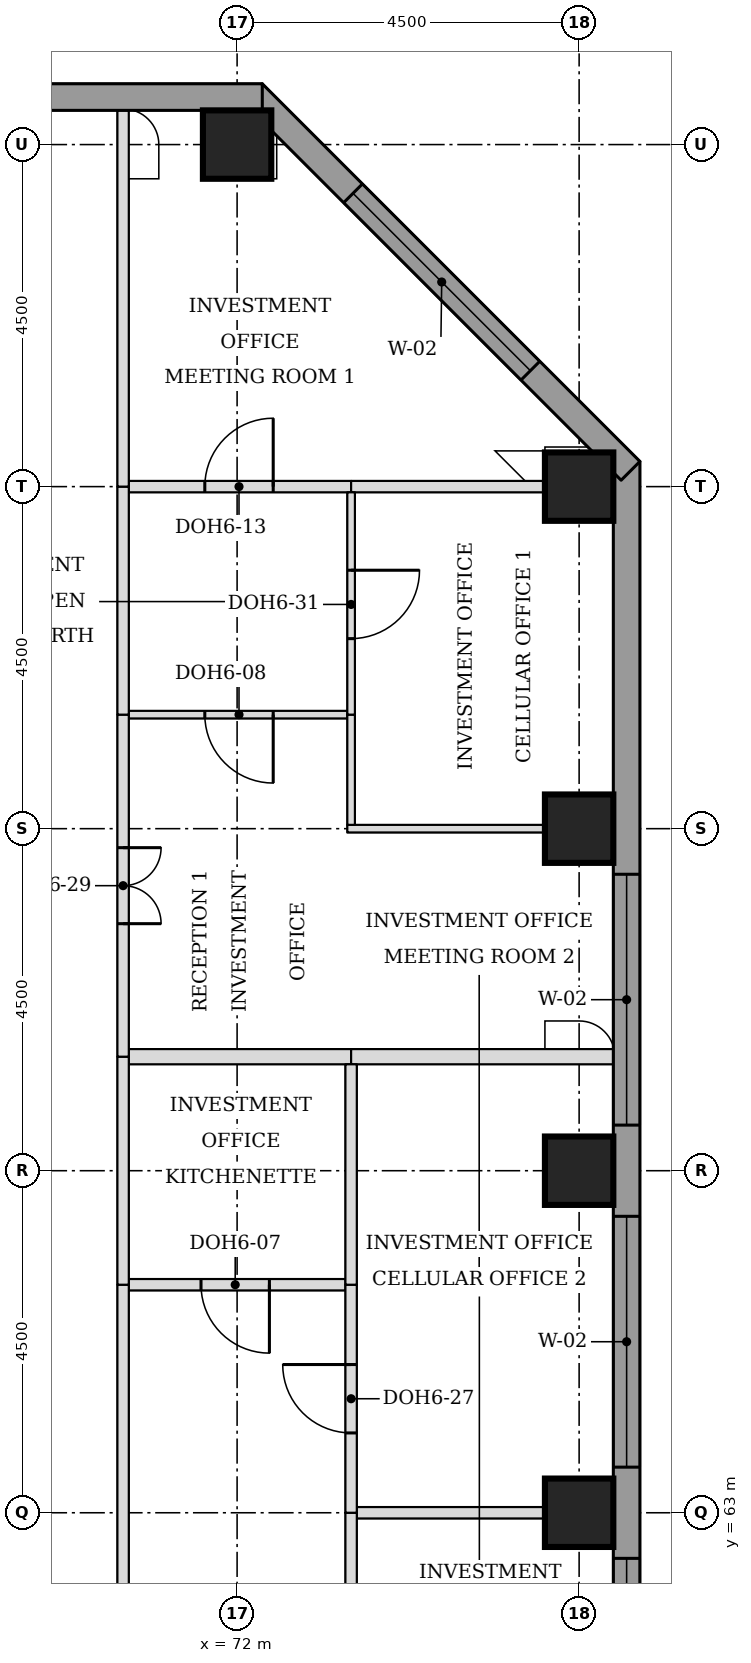
"""IFC4 building model, lengths in metres.
Left out: names, types, materials, properties, quantities, classifications, styles, units other than length and angle.
Written with IfcOpenShell. Run it as: python <this file> out.ifc"""

import sys

from ifc_helpers import new_model, si_unit, direction, frame, frame_2d, origin, origin_2d, place, context, subcontext, project, spatial, rectangle, extrude, element, fill, save


model = new_model("IFC4")
c1 = context("Model", 3, precision=1e-05, world=origin(), true_north=direction((0.0, 1.0)))
c2 = subcontext(c1, "Body", "Model", "MODEL_VIEW")
j1 = project(units=[si_unit("LENGTHUNIT", "METRE"), si_unit("PLANEANGLEUNIT", "RADIAN")], contexts=[c1])
p1 = place(None, origin())
s1 = spatial("IfcSite", under=j1, at=p1, CompositionType="ELEMENT")
p2 = place(p1, origin())
s2 = spatial("IfcBuilding", under=s1, at=p2, CompositionType="ELEMENT")
p3 = place(p2, frame((0.0, 0.0, 184.7)))
s3 = spatial("IfcBuildingStorey", under=s2, at=p3, CompositionType="ELEMENT", Elevation=184.7)
for number, where, z_axis, x_axis in (
    (1, (76.5, 63.0, 0.0), (0.0, 0.0, 1.0), (1.0, 0.0, 0.0)),
    (2, (76.5, 67.5, 0.0), (0.0, 0.0, 1.0), (1.0, 0.0, 0.0)),
    (3, (76.5, 72.0, 0.0), (0.0, 0.0, 1.0), (1.0, 0.0, 0.0)),
    (4, (76.5, 76.5, 0.0), (0.0, 0.0, 1.0), (1.0, 0.0, 0.0)),
    (5, (72.0, 81.0, 0.0), (0.0, 0.0, 1.0), (1.0, 0.0, 0.0)),
):
    element("IfcColumn", number, at=place(p3, frame(where, z_axis=z_axis, x_axis=x_axis)), inside=s3, PredefinedType="COLUMN", context=c2, shape_type="SweptSolid", body=[
        extrude(rectangle(XDim=0.9, YDim=0.9, at=origin_2d()), origin(), (0.0, 0.0, 1.0), 3.7),
    ])
p4 = place(p3, frame((77.125, 44.669, 0.0), z_axis=(0.0, 0.0, 1.0), x_axis=(0.0, 1.0, 0.0)))
e6 = element("IfcWall", 6, at=p4, inside=s3, PredefinedType="STANDARD", context=c2, shape_type="SweptSolid", body=[
    extrude(rectangle(XDim=32.163, YDim=0.35, at=frame_2d((16.081, 0.0))), origin(), (0.0, 0.0, 1.0), 3.525),
])
p5 = place(p4, frame((5.431, 0.0, 0.9)))
e7 = element("IfcOpeningElement", 7, at=p5, cuts=e6, PredefinedType="OPENING", context=c2, shape_type="SweptSolid", body=[
    extrude(rectangle(XDim=3.3, YDim=1.9, at=frame_2d((1.65, 0.95))), frame((0.0, 0.185, 0.0), z_axis=(0.0, -1.0, 0.0), x_axis=(1.0, 0.0, 0.0)), (0.0, 0.0, 1.0), 0.37),
])
p6 = place(p4, frame((9.931, 0.0, 0.9)))
e8 = element("IfcOpeningElement", 8, at=p6, cuts=e6, PredefinedType="OPENING", context=c2, shape_type="SweptSolid", body=[
    extrude(rectangle(XDim=3.3, YDim=1.9, at=frame_2d((1.65, 0.95))), frame((0.0, 0.185, 0.0), z_axis=(0.0, -1.0, 0.0), x_axis=(1.0, 0.0, 0.0)), (0.0, 0.0, 1.0), 0.37),
])
p7 = place(p4, frame((14.431, 0.0, 0.9)))
e9 = element("IfcOpeningElement", 9, at=p7, cuts=e6, PredefinedType="OPENING", context=c2, shape_type="SweptSolid", body=[
    extrude(rectangle(XDim=3.3, YDim=1.9, at=frame_2d((1.65, 0.95))), frame((0.0, 0.185, 0.0), z_axis=(0.0, -1.0, 0.0), x_axis=(1.0, 0.0, 0.0)), (0.0, 0.0, 1.0), 0.37),
])
p8 = place(p4, frame((18.931, 0.0, 0.9)))
e10 = element("IfcOpeningElement", 10, at=p8, cuts=e6, PredefinedType="OPENING", context=c2, shape_type="SweptSolid", body=[
    extrude(rectangle(XDim=3.3, YDim=1.9, at=frame_2d((1.65, 0.95))), frame((0.0, 0.185, 0.0), z_axis=(0.0, -1.0, 0.0), x_axis=(1.0, 0.0, 0.0)), (0.0, 0.0, 1.0), 0.37),
])
p9 = place(p4, frame((23.431, 0.0, 0.9)))
e11 = element("IfcOpeningElement", 11, at=p9, cuts=e6, PredefinedType="OPENING", context=c2, shape_type="SweptSolid", body=[
    extrude(rectangle(XDim=3.3, YDim=1.9, at=frame_2d((1.65, 0.95))), frame((0.0, 0.185, 0.0), z_axis=(0.0, -1.0, 0.0), x_axis=(1.0, 0.0, 0.0)), (0.0, 0.0, 1.0), 0.37),
])
p10 = place(p3, frame((77.176, 76.708, 0.0), z_axis=(0.0, 0.0, 1.0), x_axis=(-0.707106781187, 0.707106781187, 0.0)))
e12 = element("IfcWall", 12, at=p10, inside=s3, PredefinedType="STANDARD", context=c2, shape_type="SweptSolid", body=[
    extrude(rectangle(XDim=7.027, YDim=0.35, at=frame_2d((3.513, 0.0))), origin(), (0.0, 0.0, 1.0), 3.525),
])
p11 = place(p10, frame((1.863, 0.0, 0.9)))
e13 = element("IfcOpeningElement", 13, at=p11, cuts=e12, PredefinedType="OPENING", context=c2, shape_type="SweptSolid", body=[
    extrude(rectangle(XDim=3.3, YDim=1.9, at=frame_2d((1.65, 0.95))), frame((0.0, 0.185, 0.0), z_axis=(0.0, -1.0, 0.0), x_axis=(1.0, 0.0, 0.0)), (0.0, 0.0, 1.0), 0.37),
])
p12 = place(p3, frame((72.331, 81.625, 0.0), z_axis=(0.0, 0.0, 1.0), x_axis=(-1.0, 0.0, 0.0)))
e14 = element("IfcWall", 14, at=p12, inside=s3, PredefinedType="STANDARD", context=c2, shape_type="SweptSolid", body=[
    extrude(rectangle(XDim=32.163, YDim=0.35, at=frame_2d((16.081, 0.0))), origin(), (0.0, 0.0, 1.0), 3.525),
])
p13 = place(p12, frame((5.431, 0.0, 0.9)))
e15 = element("IfcOpeningElement", 15, at=p13, cuts=e14, PredefinedType="OPENING", context=c2, shape_type="SweptSolid", body=[
    extrude(rectangle(XDim=3.3, YDim=1.9, at=frame_2d((1.65, 0.95))), frame((0.0, 0.185, 0.0), z_axis=(0.0, -1.0, 0.0), x_axis=(1.0, 0.0, 0.0)), (0.0, 0.0, 1.0), 0.37),
])
p14 = place(p12, frame((9.931, 0.0, 0.9)))
e16 = element("IfcOpeningElement", 16, at=p14, cuts=e14, PredefinedType="OPENING", context=c2, shape_type="SweptSolid", body=[
    extrude(rectangle(XDim=3.3, YDim=1.9, at=frame_2d((1.65, 0.95))), frame((0.0, 0.185, 0.0), z_axis=(0.0, -1.0, 0.0), x_axis=(1.0, 0.0, 0.0)), (0.0, 0.0, 1.0), 0.37),
])
p15 = place(p12, frame((14.431, 0.0, 0.9)))
e17 = element("IfcOpeningElement", 17, at=p15, cuts=e14, PredefinedType="OPENING", context=c2, shape_type="SweptSolid", body=[
    extrude(rectangle(XDim=3.3, YDim=1.9, at=frame_2d((1.65, 0.95))), frame((0.0, 0.185, 0.0), z_axis=(0.0, -1.0, 0.0), x_axis=(1.0, 0.0, 0.0)), (0.0, 0.0, 1.0), 0.37),
])
p16 = place(p12, frame((18.931, 0.0, 0.9)))
e18 = element("IfcOpeningElement", 18, at=p16, cuts=e14, PredefinedType="OPENING", context=c2, shape_type="SweptSolid", body=[
    extrude(rectangle(XDim=3.3, YDim=1.9, at=frame_2d((1.65, 0.95))), frame((0.0, 0.185, 0.0), z_axis=(0.0, -1.0, 0.0), x_axis=(1.0, 0.0, 0.0)), (0.0, 0.0, 1.0), 0.37),
])
p17 = place(p12, frame((23.431, 0.0, 0.9)))
e19 = element("IfcOpeningElement", 19, at=p17, cuts=e14, PredefinedType="OPENING", context=c2, shape_type="SweptSolid", body=[
    extrude(rectangle(XDim=3.3, YDim=1.9, at=frame_2d((1.65, 0.95))), frame((0.0, 0.185, 0.0), z_axis=(0.0, -1.0, 0.0), x_axis=(1.0, 0.0, 0.0)), (0.0, 0.0, 1.0), 0.37),
])
p18 = place(p3, frame((73.575, 63.0, 0.0), z_axis=(0.0, 0.0, 1.0), x_axis=(1.0, 0.0, 0.0)))
e20 = element("IfcWall", 20, at=p18, inside=s3, PredefinedType="PARTITIONING", context=c2, shape_type="SweptSolid", body=[
    extrude(rectangle(XDim=3.375, YDim=0.15, at=frame_2d((1.688, 0.0))), origin(), (0.0, 0.0, 1.0), 3.55),
])
p19 = place(p3, frame((70.575, 66.0, 0.0), z_axis=(0.0, 0.0, 1.0), x_axis=(1.0, 0.0, 0.0)))
e21 = element("IfcWall", 21, at=p19, inside=s3, PredefinedType="PARTITIONING", context=c2, shape_type="SweptSolid", body=[
    extrude(rectangle(XDim=2.85, YDim=0.15, at=frame_2d((1.425, 0.0))), origin(), (0.0, 0.0, 1.0), 3.55),
])
p20 = place(p19, frame((0.95, 0.0, 0.0)))
e22 = element("IfcOpeningElement", 22, at=p20, cuts=e21, PredefinedType="OPENING", context=c2, shape_type="SweptSolid", body=[
    extrude(rectangle(XDim=0.9, YDim=2.1, at=frame_2d((0.45, 1.05))), frame((0.0, 0.085, 0.0), z_axis=(0.0, -1.0, 0.0), x_axis=(1.0, 0.0, 0.0)), (0.0, 0.0, 1.0), 0.17),
])
p21 = place(p3, frame((70.575, 69.0, 0.0), z_axis=(0.0, 0.0, 1.0), x_axis=(1.0, 0.0, 0.0)))
e23 = element("IfcWall", 23, at=p21, inside=s3, PredefinedType="PARTITIONING", context=c2, shape_type="SweptSolid", body=[
    extrude(rectangle(XDim=2.925, YDim=0.2, at=frame_2d((1.462, 0.0))), origin(), (0.0, 0.0, 1.0), 3.55),
])
p22 = place(p3, frame((73.5, 69.0, 0.0), z_axis=(0.0, 0.0, 1.0), x_axis=(1.0, 0.0, 0.0)))
e24 = element("IfcWall", 24, at=p22, inside=s3, PredefinedType="PARTITIONING", context=c2, shape_type="SweptSolid", body=[
    extrude(rectangle(XDim=3.45, YDim=0.2, at=frame_2d((1.725, 0.0))), origin(), (0.0, 0.0, 1.0), 3.55),
])
p23 = place(p3, frame((73.45, 72.0, 0.0), z_axis=(0.0, 0.0, 1.0), x_axis=(1.0, 0.0, 0.0)))
e25 = element("IfcWall", 25, at=p23, inside=s3, PredefinedType="PARTITIONING", context=c2, shape_type="SweptSolid", body=[
    extrude(rectangle(XDim=3.5, YDim=0.1, at=frame_2d((1.75, 0.0))), origin(), (0.0, 0.0, 1.0), 3.55),
])
p24 = place(p3, frame((70.575, 73.5, 0.0), z_axis=(0.0, 0.0, 1.0), x_axis=(1.0, 0.0, 0.0)))
e26 = element("IfcWall", 26, at=p24, inside=s3, PredefinedType="PARTITIONING", context=c2, shape_type="SweptSolid", body=[
    extrude(rectangle(XDim=2.875, YDim=0.1, at=frame_2d((1.438, 0.0))), origin(), (0.0, 0.0, 1.0), 3.096),
])
p25 = place(p24, frame((1.0, 0.0, 0.0)))
e27 = element("IfcOpeningElement", 27, at=p25, cuts=e26, PredefinedType="OPENING", context=c2, shape_type="SweptSolid", body=[
    extrude(rectangle(XDim=0.9, YDim=2.1, at=frame_2d((0.45, 1.05))), frame((0.0, 0.06, 0.0), z_axis=(0.0, -1.0, 0.0), x_axis=(1.0, 0.0, 0.0)), (0.0, 0.0, 1.0), 0.12),
])
p26 = place(p3, frame((70.575, 76.5, 0.0), z_axis=(0.0, 0.0, 1.0), x_axis=(1.0, 0.0, 0.0)))
e28 = element("IfcWall", 28, at=p26, inside=s3, PredefinedType="PARTITIONING", context=c2, shape_type="SweptSolid", body=[
    extrude(rectangle(XDim=2.925, YDim=0.15, at=frame_2d((1.462, 0.0))), origin(), (0.0, 0.0, 1.0), 3.096),
])
p27 = place(p26, frame((1.0, 0.0, 0.0)))
e29 = element("IfcOpeningElement", 29, at=p27, cuts=e28, PredefinedType="OPENING", context=c2, shape_type="SweptSolid", body=[
    extrude(rectangle(XDim=0.9, YDim=2.1, at=frame_2d((0.45, 1.05))), frame((0.0, 0.085, 0.0), z_axis=(0.0, -1.0, 0.0), x_axis=(1.0, 0.0, 0.0)), (0.0, 0.0, 1.0), 0.17),
])
p28 = place(p3, frame((73.5, 76.5, 0.0), z_axis=(0.0, 0.0, 1.0), x_axis=(1.0, 0.0, 0.0)))
e30 = element("IfcWall", 30, at=p28, inside=s3, PredefinedType="PARTITIONING", context=c2, shape_type="SweptSolid", body=[
    extrude(rectangle(XDim=2.55, YDim=0.15, at=frame_2d((1.275, 0.0))), origin(), (0.0, 0.0, 1.0), 3.096),
])
p29 = place(p3, frame((70.5, 45.0, 0.0), z_axis=(0.0, 0.0, 1.0), x_axis=(0.0, 1.0, 0.0)))
e31 = element("IfcWall", 31, at=p29, inside=s3, PredefinedType="PARTITIONING", context=c2, shape_type="SweptSolid", body=[
    extrude(rectangle(XDim=21.0, YDim=0.15, at=frame_2d((10.5, 0.0))), origin(), (0.0, 0.0, 1.0), 3.55),
])
p30 = place(p3, frame((73.5, 58.5, 0.0), z_axis=(0.0, 0.0, 1.0), x_axis=(0.0, 1.0, 0.0)))
e32 = element("IfcWall", 32, at=p30, inside=s3, PredefinedType="PARTITIONING", context=c2, shape_type="SweptSolid", body=[
    extrude(rectangle(XDim=4.5, YDim=0.15, at=frame_2d((2.25, 0.0))), origin(), (0.0, 0.0, 1.0), 3.55),
])
p31 = place(p30, frame((1.8, 0.0, 0.0)))
e33 = element("IfcOpeningElement", 33, at=p31, cuts=e32, PredefinedType="OPENING", context=c2, shape_type="SweptSolid", body=[
    extrude(rectangle(XDim=0.9, YDim=2.1, at=frame_2d((0.45, 1.05))), frame((0.0, 0.085, 0.0), z_axis=(0.0, -1.0, 0.0), x_axis=(1.0, 0.0, 0.0)), (0.0, 0.0, 1.0), 0.17),
])
p32 = place(p3, frame((73.5, 63.0, 0.0), z_axis=(0.0, 0.0, 1.0), x_axis=(0.0, 1.0, 0.0)))
e34 = element("IfcWall", 34, at=p32, inside=s3, PredefinedType="PARTITIONING", context=c2, shape_type="SweptSolid", body=[
    extrude(rectangle(XDim=3.0, YDim=0.15, at=frame_2d((1.5, 0.0))), origin(), (0.0, 0.0, 1.0), 3.55),
])
p33 = place(p32, frame((1.05, 0.0, 0.0)))
e35 = element("IfcOpeningElement", 35, at=p33, cuts=e34, PredefinedType="OPENING", context=c2, shape_type="SweptSolid", body=[
    extrude(rectangle(XDim=0.9, YDim=2.1, at=frame_2d((0.45, 1.05))), frame((0.0, 0.085, 0.0), z_axis=(0.0, -1.0, 0.0), x_axis=(1.0, 0.0, 0.0)), (0.0, 0.0, 1.0), 0.17),
])
p34 = place(p3, frame((70.5, 66.0, 0.0), z_axis=(0.0, 0.0, 1.0), x_axis=(0.0, 1.0, 0.0)))
e36 = element("IfcWall", 36, at=p34, inside=s3, PredefinedType="PARTITIONING", context=c2, shape_type="SweptSolid", body=[
    extrude(rectangle(XDim=3.0, YDim=0.15, at=frame_2d((1.5, 0.0))), origin(), (0.0, 0.0, 1.0), 3.55),
])
p35 = place(p3, frame((73.5, 66.0, 0.0), z_axis=(0.0, 0.0, 1.0), x_axis=(0.0, 1.0, 0.0)))
e37 = element("IfcWall", 37, at=p35, inside=s3, PredefinedType="PARTITIONING", context=c2, shape_type="SweptSolid", body=[
    extrude(rectangle(XDim=2.9, YDim=0.15, at=frame_2d((1.45, 0.0))), origin(), (0.0, 0.0, 1.0), 3.55),
])
p36 = place(p3, frame((70.5, 69.0, 0.0), z_axis=(0.0, 0.0, 1.0), x_axis=(0.0, 1.0, 0.0)))
e38 = element("IfcWall", 38, at=p36, inside=s3, PredefinedType="PARTITIONING", context=c2, shape_type="SweptSolid", body=[
    extrude(rectangle(XDim=4.5, YDim=0.15, at=frame_2d((2.25, 0.0))), origin(), (0.0, 0.0, 1.0), 3.55),
])
p37 = place(p36, frame((1.75, 0.0, 0.0)))
e39 = element("IfcOpeningElement", 39, at=p37, cuts=e38, PredefinedType="OPENING", context=c2, shape_type="SweptSolid", body=[
    extrude(rectangle(XDim=1.0, YDim=2.1, at=frame_2d((0.5, 1.05))), frame((0.0, 0.085, 0.0), z_axis=(0.0, -1.0, 0.0), x_axis=(1.0, 0.0, 0.0)), (0.0, 0.0, 1.0), 0.17),
])
p38 = place(p3, frame((73.5, 72.05, 0.0), z_axis=(0.0, 0.0, 1.0), x_axis=(0.0, 1.0, 0.0)))
e40 = element("IfcWall", 40, at=p38, inside=s3, PredefinedType="PARTITIONING", context=c2, shape_type="SweptSolid", body=[
    extrude(rectangle(XDim=1.45, YDim=0.1, at=frame_2d((0.725, 0.0))), origin(), (0.0, 0.0, 1.0), 3.55),
])
p39 = place(p3, frame((70.5, 73.5, 0.0), z_axis=(0.0, 0.0, 1.0), x_axis=(0.0, 1.0, 0.0)))
e41 = element("IfcWall", 41, at=p39, inside=s3, PredefinedType="PARTITIONING", context=c2, shape_type="SweptSolid", body=[
    extrude(rectangle(XDim=3.0, YDim=0.15, at=frame_2d((1.5, 0.0))), origin(), (0.0, 0.0, 1.0), 3.55),
])
p40 = place(p3, frame((73.5, 73.5, 0.0), z_axis=(0.0, 0.0, 1.0), x_axis=(0.0, 1.0, 0.0)))
e42 = element("IfcWall", 42, at=p40, inside=s3, PredefinedType="PARTITIONING", context=c2, shape_type="SweptSolid", body=[
    extrude(rectangle(XDim=2.925, YDim=0.1, at=frame_2d((1.462, 0.0))), origin(), (0.0, 0.0, 1.0), 3.55),
])
p41 = place(p40, frame((1.0, 0.0, 0.0)))
e43 = element("IfcOpeningElement", 43, at=p41, cuts=e42, PredefinedType="OPENING", context=c2, shape_type="SweptSolid", body=[
    extrude(rectangle(XDim=0.9, YDim=2.1, at=frame_2d((0.45, 1.05))), frame((0.0, 0.06, 0.0), z_axis=(0.0, -1.0, 0.0), x_axis=(1.0, 0.0, 0.0)), (0.0, 0.0, 1.0), 0.12),
])
p42 = place(p3, frame((70.5, 76.5, 0.0), z_axis=(0.0, 0.0, 1.0), x_axis=(0.0, 1.0, 0.0)))
e44 = element("IfcWall", 44, at=p42, inside=s3, PredefinedType="PARTITIONING", context=c2, shape_type="SweptSolid", body=[
    extrude(rectangle(XDim=4.95, YDim=0.15, at=frame_2d((2.475, 0.0))), origin(), (0.0, 0.0, 1.0), 3.55),
])
p43 = place(p7, origin())
e45 = element("IfcWindow", 45, at=p43, inside=s3, PartitioningType="SINGLE_PANEL", PredefinedType="WINDOW", context=c2, shape_type="SweptSolid", body=[
    extrude(rectangle(XDim=3.3, YDim=1.9, at=frame_2d((1.65, 0.95))), frame((0.0, 0.085, 0.0), z_axis=(0.0, -1.0, 0.0), x_axis=(1.0, 0.0, 0.0)), (0.0, 0.0, 1.0), 0.06),
])
fill(e9, e45)
p44 = place(p8, origin())
e46 = element("IfcWindow", 46, at=p44, inside=s3, PartitioningType="SINGLE_PANEL", PredefinedType="WINDOW", context=c2, shape_type="SweptSolid", body=[
    extrude(rectangle(XDim=3.3, YDim=1.9, at=frame_2d((1.65, 0.95))), frame((0.0, 0.085, 0.0), z_axis=(0.0, -1.0, 0.0), x_axis=(1.0, 0.0, 0.0)), (0.0, 0.0, 1.0), 0.06),
])
fill(e10, e46)
p45 = place(p9, origin())
e47 = element("IfcWindow", 47, at=p45, inside=s3, PartitioningType="SINGLE_PANEL", PredefinedType="WINDOW", context=c2, shape_type="SweptSolid", body=[
    extrude(rectangle(XDim=3.3, YDim=1.9, at=frame_2d((1.65, 0.95))), frame((0.0, 0.085, 0.0), z_axis=(0.0, -1.0, 0.0), x_axis=(1.0, 0.0, 0.0)), (0.0, 0.0, 1.0), 0.06),
])
fill(e11, e47)
p46 = place(p11, origin())
e48 = element("IfcWindow", 48, at=p46, inside=s3, PartitioningType="SINGLE_PANEL", PredefinedType="WINDOW", context=c2, shape_type="SweptSolid", body=[
    extrude(rectangle(XDim=3.3, YDim=1.9, at=frame_2d((1.65, 0.95))), frame((0.0, 0.085, 0.0), z_axis=(0.0, -1.0, 0.0), x_axis=(1.0, 0.0, 0.0)), (0.0, 0.0, 1.0), 0.06),
])
fill(e13, e48)
p47 = place(p20, frame((0.9, 0.0, 0.0), z_axis=(0.0, 0.0, 1.0), x_axis=(-1.0, 0.0, 0.0)))
e49 = element("IfcDoor", 49, at=p47, inside=s3, OperationType="SINGLE_SWING_LEFT", PredefinedType="DOOR", context=c2, shape_type="SweptSolid", body=[
    extrude(rectangle(XDim=0.9, YDim=2.1, at=frame_2d((0.45, 1.05))), frame((0.0, 0.025, 0.0), z_axis=(0.0, -1.0, 0.0), x_axis=(1.0, 0.0, 0.0)), (0.0, 0.0, 1.0), 0.05),
])
fill(e22, e49)
p48 = place(p33, origin())
e50 = element("IfcDoor", 50, at=p48, inside=s3, OperationType="SINGLE_SWING_RIGHT", PredefinedType="DOOR", context=c2, shape_type="SweptSolid", body=[
    extrude(rectangle(XDim=0.9, YDim=2.1, at=frame_2d((0.45, 1.05))), frame((0.0, 0.025, 0.0), z_axis=(0.0, -1.0, 0.0), x_axis=(1.0, 0.0, 0.0)), (0.0, 0.0, 1.0), 0.05),
])
fill(e35, e50)
p49 = place(p37, frame((1.0, 0.0, 0.0), z_axis=(0.0, 0.0, 1.0), x_axis=(-1.0, 0.0, 0.0)))
e51 = element("IfcDoor", 51, at=p49, inside=s3, OperationType="DOUBLE_DOOR_SINGLE_SWING", PredefinedType="DOOR", context=c2, shape_type="SweptSolid", body=[
    extrude(rectangle(XDim=1.0, YDim=2.1, at=frame_2d((0.5, 1.05))), frame((0.0, 0.025, 0.0), z_axis=(0.0, -1.0, 0.0), x_axis=(1.0, 0.0, 0.0)), (0.0, 0.0, 1.0), 0.05),
])
fill(e39, e51)
p50 = place(p25, frame((0.9, 0.0, 0.0), z_axis=(0.0, 0.0, 1.0), x_axis=(-1.0, 0.0, 0.0)))
e52 = element("IfcDoor", 52, at=p50, inside=s3, OperationType="SINGLE_SWING_LEFT", PredefinedType="DOOR", context=c2, shape_type="SweptSolid", body=[
    extrude(rectangle(XDim=0.9, YDim=2.1, at=frame_2d((0.45, 1.05))), frame((0.0, 0.025, 0.0), z_axis=(0.0, -1.0, 0.0), x_axis=(1.0, 0.0, 0.0)), (0.0, 0.0, 1.0), 0.05),
])
fill(e27, e52)
p51 = place(p41, frame((0.9, 0.0, 0.0), z_axis=(0.0, 0.0, 1.0), x_axis=(-1.0, 0.0, 0.0)))
e53 = element("IfcDoor", 53, at=p51, inside=s3, OperationType="SINGLE_SWING_LEFT", PredefinedType="DOOR", context=c2, shape_type="SweptSolid", body=[
    extrude(rectangle(XDim=0.9, YDim=2.1, at=frame_2d((0.45, 1.05))), frame((0.0, 0.025, 0.0), z_axis=(0.0, -1.0, 0.0), x_axis=(1.0, 0.0, 0.0)), (0.0, 0.0, 1.0), 0.05),
])
fill(e43, e53)
p52 = place(p27, origin())
e54 = element("IfcDoor", 54, at=p52, inside=s3, OperationType="SINGLE_SWING_RIGHT", PredefinedType="DOOR", context=c2, shape_type="SweptSolid", body=[
    extrude(rectangle(XDim=0.9, YDim=2.1, at=frame_2d((0.45, 1.05))), frame((0.0, 0.025, 0.0), z_axis=(0.0, -1.0, 0.0), x_axis=(1.0, 0.0, 0.0)), (0.0, 0.0, 1.0), 0.05),
])
fill(e29, e54)
save(model, sys.argv[1])
